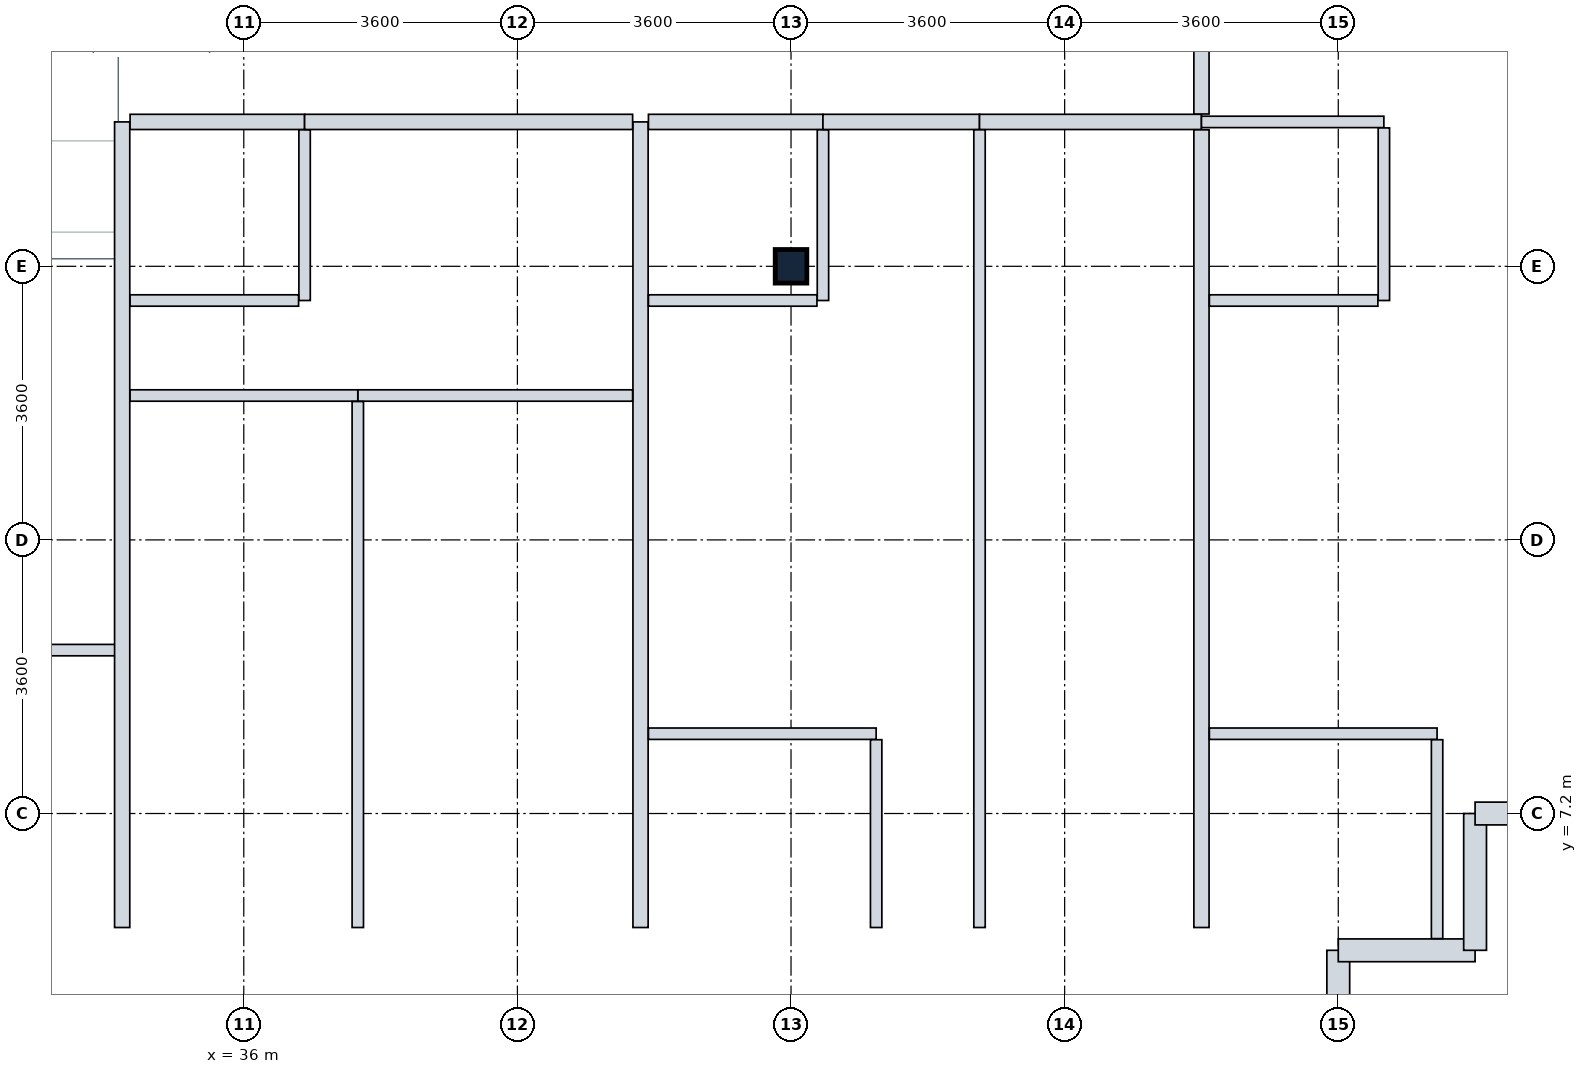
"""IFC4 building model, lengths in metres.
Left out: names, types, materials, properties, quantities, classifications, styles, units other than length and angle.
Written with IfcOpenShell. Run it as: python <this file> out.ifc"""

import sys

from ifc_helpers import new_model, si_unit, direction, frame, frame_2d, origin, origin_2d, place, context, subcontext, project, spatial, rectangle, i_section, extrude, element, fill, save


model = new_model("IFC4")
c1 = context("Model", 3, precision=1e-05, world=origin(), true_north=direction((0.0, 1.0)))
c2 = subcontext(c1, "Body", "Model", "MODEL_VIEW")
j1 = project(units=[si_unit("LENGTHUNIT", "METRE"), si_unit("PLANEANGLEUNIT", "RADIAN")], contexts=[c1])
p1 = place(None, origin())
s1 = spatial("IfcSite", under=j1, at=p1, CompositionType="ELEMENT")
p2 = place(p1, origin())
s2 = spatial("IfcBuilding", under=s1, at=p2, CompositionType="ELEMENT")
p3 = place(p2, frame((0.0, 0.0, 139.0)))
s3 = spatial("IfcBuildingStorey", under=s2, at=p3, CompositionType="ELEMENT", Elevation=139.0)
p4 = place(p3, frame((43.2, 14.4, 0.0), z_axis=(0.0, 0.0, 1.0), x_axis=(1.0, 0.0, 0.0)))
e1 = element("IfcColumn", 1, at=p4, inside=s3, PredefinedType="COLUMN", context=c2, shape_type="SweptSolid", body=[
    extrude(i_section(OverallWidth=0.416, OverallDepth=0.442, WebThickness=0.025, FlangeThickness=0.041, FilletRadius=0.015, at=origin_2d()), origin(), (0.0, 0.0, 1.0), 3.8),
])
p5 = place(p3, frame((50.4, 5.4, 0.0), z_axis=(0.0, 0.0, 1.0), x_axis=(0.0, -1.0, 0.0)))
e2 = element("IfcWall", 2, at=p5, inside=s3, PredefinedType="STANDARD", context=c2, shape_type="SweptSolid", body=[
    extrude(rectangle(XDim=1.8, YDim=0.3, at=frame_2d((0.9, 0.0))), origin(), (0.0, 0.0, 1.0), 2.93),
])
for number, where, z_axis, x_axis in (
    (3, (52.2, 5.4, 0.0), (0.0, 0.0, 1.0), (-1.0, 0.0, 0.0)),
    (4, (52.2, 7.2, 0.0), (0.0, 0.0, 1.0), (0.0, -1.0, 0.0)),
):
    element("IfcWall", number, at=place(p3, frame(where, z_axis=z_axis, x_axis=x_axis)), inside=s3, PredefinedType="STANDARD", context=c2, shape_type="SweptSolid", body=[
        extrude(rectangle(XDim=1.8, YDim=0.3, at=frame_2d((0.9, 0.0))), origin(), (0.0, 0.0, 1.0), 3.535),
    ])
p6 = place(p3, frame((54.0, 7.2, 0.0), z_axis=(0.0, 0.0, 1.0), x_axis=(-1.0, 0.0, 0.0)))
e5 = element("IfcWall", 5, at=p6, inside=s3, PredefinedType="STANDARD", context=c2, shape_type="SweptSolid", body=[
    extrude(rectangle(XDim=1.8, YDim=0.3, at=frame_2d((0.9, 0.0))), origin(), (0.0, 0.0, 1.0), 2.93),
])
p7 = place(p3, frame((28.879, 9.35, 0.0), z_axis=(0.0, 0.0, 1.0), x_axis=(1.0, 0.0, 0.0)))
e6 = element("IfcWall", 6, at=p7, inside=s3, PredefinedType="PARTITIONING", context=c2, shape_type="SweptSolid", body=[
    extrude(rectangle(XDim=5.521, YDim=0.15, at=frame_2d((2.76, 0.0))), origin(), (0.0, 0.0, 1.0), 3.535),
])
p8 = place(p7, frame((0.36, 0.0, 0.0)))
e7 = element("IfcOpeningElement", 7, at=p8, cuts=e6, PredefinedType="OPENING", context=c2, shape_type="SweptSolid", body=[
    extrude(rectangle(XDim=1.0, YDim=2.1, at=frame_2d((0.5, 1.05))), frame((0.0, 0.085, 0.0), z_axis=(0.0, -1.0, 0.0), x_axis=(1.0, 0.0, 0.0)), (0.0, 0.0, 1.0), 0.17),
])
p9 = place(p3, frame((34.4, 5.7, 0.0), z_axis=(0.0, 0.0, 1.0), x_axis=(0.0, 1.0, 0.0)))
e8 = element("IfcWall", 8, at=p9, inside=s3, PredefinedType="PARTITIONING", context=c2, shape_type="SweptSolid", body=[
    extrude(rectangle(XDim=10.6, YDim=0.2, at=frame_2d((5.3, 0.0))), origin(), (0.0, 0.0, 1.0), 3.17),
])
p10 = place(p3, frame((41.22, 5.7, 0.0), z_axis=(0.0, 0.0, 1.0), x_axis=(0.0, 1.0, 0.0)))
e9 = element("IfcWall", 9, at=p10, inside=s3, PredefinedType="PARTITIONING", context=c2, shape_type="SweptSolid", body=[
    extrude(rectangle(XDim=10.6, YDim=0.2, at=frame_2d((5.3, 0.0))), origin(), (0.0, 0.0, 1.0), 3.13),
])
p11 = place(p3, frame((34.504, 16.3, 0.0), z_axis=(0.0, 0.0, 1.0), x_axis=(1.0, 0.0, 0.0)))
e10 = element("IfcWall", 10, at=p11, inside=s3, PredefinedType="PARTITIONING", context=c2, shape_type="SweptSolid", body=[
    extrude(rectangle(XDim=2.296, YDim=0.2, at=frame_2d((1.148, 0.0))), origin(), (0.0, 0.0, 1.0), 3.22),
])
p12 = place(p3, frame((36.8, 13.95, 0.0), z_axis=(0.0, 0.0, 1.0), x_axis=(0.0, 1.0, 0.0)))
e11 = element("IfcWall", 11, at=p12, inside=s3, PredefinedType="PARTITIONING", context=c2, shape_type="SweptSolid", body=[
    extrude(rectangle(XDim=2.246, YDim=0.15, at=frame_2d((1.123, 0.0))), origin(), (0.0, 0.0, 1.0), 3.17),
])
p13 = place(p12, frame((0.72, 0.0, 0.0)))
e12 = element("IfcOpeningElement", 12, at=p13, cuts=e11, PredefinedType="OPENING", context=c2, shape_type="SweptSolid", body=[
    extrude(rectangle(XDim=0.85, YDim=2.1, at=frame_2d((0.425, 1.05))), frame((0.0, 0.085, 0.0), z_axis=(0.0, -1.0, 0.0), x_axis=(1.0, 0.0, 0.0)), (0.0, 0.0, 1.0), 0.17),
])
p14 = place(p3, frame((34.504, 13.95, 0.0), z_axis=(0.0, 0.0, 1.0), x_axis=(1.0, 0.0, 0.0)))
e13 = element("IfcWall", 13, at=p14, inside=s3, PredefinedType="PARTITIONING", context=c2, shape_type="SweptSolid", body=[
    extrude(rectangle(XDim=2.217, YDim=0.15, at=frame_2d((1.108, 0.0))), origin(), (0.0, 0.0, 1.0), 3.22),
])
p15 = place(p3, frame((36.8, 16.3, 0.0), z_axis=(0.0, 0.0, 1.0), x_axis=(1.0, 0.0, 0.0)))
e14 = element("IfcWall", 14, at=p15, inside=s3, PredefinedType="PARTITIONING", context=c2, shape_type="SweptSolid", body=[
    extrude(rectangle(XDim=4.316, YDim=0.2, at=frame_2d((2.158, 0.0))), origin(), (0.0, 0.0, 1.0), 3.17),
])
p16 = place(p15, frame((1.71, 0.0, 0.0)))
e15 = element("IfcOpeningElement", 15, at=p16, cuts=e14, PredefinedType="OPENING", context=c2, shape_type="SweptSolid", body=[
    extrude(rectangle(XDim=1.0, YDim=2.1, at=frame_2d((0.5, 1.05))), frame((0.0, 0.11, 0.0), z_axis=(0.0, -1.0, 0.0), x_axis=(1.0, 0.0, 0.0)), (0.0, 0.0, 1.0), 0.22),
])
p17 = place(p3, frame((37.5, 12.7, 0.0), z_axis=(0.0, 0.0, 1.0), x_axis=(1.0, 0.0, 0.0)))
e16 = element("IfcWall", 16, at=p17, inside=s3, PredefinedType="PARTITIONING", context=c2, shape_type="SweptSolid", body=[
    extrude(rectangle(XDim=3.616, YDim=0.15, at=frame_2d((1.808, 0.0))), origin(), (0.0, 0.0, 1.0), 3.17),
])
p18 = place(p17, frame((1.371, 0.0, 0.0)))
e17 = element("IfcOpeningElement", 17, at=p18, cuts=e16, PredefinedType="OPENING", context=c2, shape_type="SweptSolid", body=[
    extrude(rectangle(XDim=0.9, YDim=2.1, at=frame_2d((0.45, 1.05))), frame((0.0, 0.085, 0.0), z_axis=(0.0, -1.0, 0.0), x_axis=(1.0, 0.0, 0.0)), (0.0, 0.0, 1.0), 0.17),
])
p19 = place(p3, frame((34.504, 12.7, 0.0), z_axis=(0.0, 0.0, 1.0), x_axis=(1.0, 0.0, 0.0)))
e18 = element("IfcWall", 18, at=p19, inside=s3, PredefinedType="PARTITIONING", context=c2, shape_type="SweptSolid", body=[
    extrude(rectangle(XDim=2.996, YDim=0.15, at=frame_2d((1.498, 0.0))), origin(), (0.0, 0.0, 1.0), 3.22),
])
p20 = place(p19, frame((1.021, 0.0, 0.0)))
e19 = element("IfcOpeningElement", 19, at=p20, cuts=e18, PredefinedType="OPENING", context=c2, shape_type="SweptSolid", body=[
    extrude(rectangle(XDim=0.85, YDim=2.1, at=frame_2d((0.425, 1.05))), frame((0.0, 0.085, 0.0), z_axis=(0.0, -1.0, 0.0), x_axis=(1.0, 0.0, 0.0)), (0.0, 0.0, 1.0), 0.17),
])
p21 = place(p3, frame((37.5, 5.7, 0.0), z_axis=(0.0, 0.0, 1.0), x_axis=(0.0, 1.0, 0.0)))
e20 = element("IfcWall", 20, at=p21, inside=s3, PredefinedType="PARTITIONING", context=c2, shape_type="SweptSolid", body=[
    extrude(rectangle(XDim=6.921, YDim=0.15, at=frame_2d((3.46, 0.0))), origin(), (0.0, 0.0, 1.0), 3.08),
])
p22 = place(p3, frame((41.324, 16.3, 0.0), z_axis=(0.0, 0.0, 1.0), x_axis=(1.0, 0.0, 0.0)))
e21 = element("IfcWall", 21, at=p22, inside=s3, PredefinedType="PARTITIONING", context=c2, shape_type="SweptSolid", body=[
    extrude(rectangle(XDim=2.296, YDim=0.2, at=frame_2d((1.148, 0.0))), origin(), (0.0, 0.0, 1.0), 3.18),
])
p23 = place(p3, frame((43.62, 13.95, 0.0), z_axis=(0.0, 0.0, 1.0), x_axis=(0.0, 1.0, 0.0)))
e22 = element("IfcWall", 22, at=p23, inside=s3, PredefinedType="PARTITIONING", context=c2, shape_type="SweptSolid", body=[
    extrude(rectangle(XDim=2.246, YDim=0.15, at=frame_2d((1.123, 0.0))), origin(), (0.0, 0.0, 1.0), 3.17),
])
p24 = place(p23, frame((0.712, 0.0, 0.0)))
e23 = element("IfcOpeningElement", 23, at=p24, cuts=e22, PredefinedType="OPENING", context=c2, shape_type="SweptSolid", body=[
    extrude(rectangle(XDim=0.85, YDim=2.1, at=frame_2d((0.425, 1.05))), frame((0.0, 0.085, 0.0), z_axis=(0.0, -1.0, 0.0), x_axis=(1.0, 0.0, 0.0)), (0.0, 0.0, 1.0), 0.17),
])
p25 = place(p3, frame((41.324, 13.95, 0.0), z_axis=(0.0, 0.0, 1.0), x_axis=(1.0, 0.0, 0.0)))
e24 = element("IfcWall", 24, at=p25, inside=s3, PredefinedType="PARTITIONING", context=c2, shape_type="SweptSolid", body=[
    extrude(rectangle(XDim=2.217, YDim=0.15, at=frame_2d((1.108, 0.0))), origin(), (0.0, 0.0, 1.0), 3.18),
])
p26 = place(p3, frame((43.62, 16.3, 0.0), z_axis=(0.0, 0.0, 1.0), x_axis=(1.0, 0.0, 0.0)))
e25 = element("IfcWall", 25, at=p26, inside=s3, PredefinedType="PARTITIONING", context=c2, shape_type="SweptSolid", body=[
    extrude(rectangle(XDim=2.06, YDim=0.2, at=frame_2d((1.03, 0.0))), origin(), (0.0, 0.0, 1.0), 3.535),
])
p27 = place(p26, frame((0.81, 0.0, 0.0)))
e26 = element("IfcOpeningElement", 26, at=p27, cuts=e25, PredefinedType="OPENING", context=c2, shape_type="SweptSolid", body=[
    extrude(rectangle(XDim=1.0, YDim=2.1, at=frame_2d((0.5, 1.05))), frame((0.0, 0.11, 0.0), z_axis=(0.0, -1.0, 0.0), x_axis=(1.0, 0.0, 0.0)), (0.0, 0.0, 1.0), 0.22),
])
p28 = place(p3, frame((45.68, 16.3, 0.0), z_axis=(0.0, 0.0, 1.0), x_axis=(1.0, 0.0, 0.0)))
e27 = element("IfcWall", 27, at=p28, inside=s3, PredefinedType="PARTITIONING", context=c2, shape_type="SweptSolid", body=[
    extrude(rectangle(XDim=2.92, YDim=0.2, at=frame_2d((1.46, 0.0))), origin(), (0.0, 0.0, 1.0), 3.17),
])
p29 = place(p3, frame((45.68, 5.7, 0.0), z_axis=(0.0, 0.0, 1.0), x_axis=(0.0, 1.0, 0.0)))
e28 = element("IfcWall", 28, at=p29, inside=s3, PredefinedType="PARTITIONING", context=c2, shape_type="SweptSolid", body=[
    extrude(rectangle(XDim=10.496, YDim=0.15, at=frame_2d((5.248, 0.0))), origin(), (0.0, 0.0, 1.0), 3.17),
])
p30 = place(p29, frame((4.81, 0.0, 0.0)))
e29 = element("IfcOpeningElement", 29, at=p30, cuts=e28, PredefinedType="OPENING", context=c2, shape_type="SweptSolid", body=[
    extrude(rectangle(XDim=0.9, YDim=2.1, at=frame_2d((0.45, 1.05))), frame((0.0, 0.085, 0.0), z_axis=(0.0, -1.0, 0.0), x_axis=(1.0, 0.0, 0.0)), (0.0, 0.0, 1.0), 0.17),
])
p31 = place(p3, frame((41.324, 8.25, 0.0), z_axis=(0.0, 0.0, 1.0), x_axis=(1.0, 0.0, 0.0)))
e30 = element("IfcWall", 30, at=p31, inside=s3, PredefinedType="PARTITIONING", context=c2, shape_type="SweptSolid", body=[
    extrude(rectangle(XDim=2.996, YDim=0.15, at=frame_2d((1.498, 0.0))), origin(), (0.0, 0.0, 1.0), 3.18),
])
p32 = place(p31, frame((1.021, 0.0, 0.0)))
e31 = element("IfcOpeningElement", 31, at=p32, cuts=e30, PredefinedType="OPENING", context=c2, shape_type="SweptSolid", body=[
    extrude(rectangle(XDim=0.85, YDim=2.1, at=frame_2d((0.425, 1.05))), frame((0.0, 0.085, 0.0), z_axis=(0.0, -1.0, 0.0), x_axis=(1.0, 0.0, 0.0)), (0.0, 0.0, 1.0), 0.17),
])
p33 = place(p3, frame((44.32, 5.7, 0.0), z_axis=(0.0, 0.0, 1.0), x_axis=(0.0, 1.0, 0.0)))
e32 = element("IfcWall", 32, at=p33, inside=s3, PredefinedType="PARTITIONING", context=c2, shape_type="SweptSolid", body=[
    extrude(rectangle(XDim=2.471, YDim=0.15, at=frame_2d((1.235, 0.0))), origin(), (0.0, 0.0, 1.0), 3.17),
])
p34 = place(p3, frame((48.6, 5.7, 0.0), z_axis=(0.0, 0.0, 1.0), x_axis=(0.0, 1.0, 0.0)))
e33 = element("IfcWall", 33, at=p34, inside=s3, PredefinedType="PARTITIONING", context=c2, shape_type="SweptSolid", body=[
    extrude(rectangle(XDim=10.496, YDim=0.2, at=frame_2d((5.248, 0.0))), origin(), (0.0, 0.0, 1.0), 3.17),
])
p35 = place(p3, frame((48.6, 16.404, 0.0), z_axis=(0.0, 0.0, 1.0), x_axis=(0.0, 1.0, 0.0)))
e34 = element("IfcWall", 34, at=p35, inside=s3, PredefinedType="PARTITIONING", context=c2, shape_type="SweptSolid", body=[
    extrude(rectangle(XDim=1.667, YDim=0.2, at=frame_2d((0.833, 0.0))), origin(), (0.0, 0.0, 1.0), 3.535),
])
p36 = place(p35, frame((0.314, 0.0, 0.0)))
e35 = element("IfcOpeningElement", 35, at=p36, cuts=e34, PredefinedType="OPENING", context=c2, shape_type="SweptSolid", body=[
    extrude(rectangle(XDim=1.0, YDim=2.1, at=frame_2d((0.5, 1.05))), frame((0.0, 0.11, 0.0), z_axis=(0.0, -1.0, 0.0), x_axis=(1.0, 0.0, 0.0)), (0.0, 0.0, 1.0), 0.22),
])
p37 = place(p3, frame((48.6, 16.3, 0.0), z_axis=(0.0, 0.0, 1.0), x_axis=(1.0, 0.0, 0.0)))
e36 = element("IfcWall", 36, at=p37, inside=s3, PredefinedType="PARTITIONING", context=c2, shape_type="SweptSolid", body=[
    extrude(rectangle(XDim=2.4, YDim=0.15, at=frame_2d((1.2, 0.0))), origin(), (0.0, 0.0, 1.0), 3.535),
])
p38 = place(p3, frame((51.0, 13.95, 0.0), z_axis=(0.0, 0.0, 1.0), x_axis=(0.0, 1.0, 0.0)))
e37 = element("IfcWall", 37, at=p38, inside=s3, PredefinedType="PARTITIONING", context=c2, shape_type="SweptSolid", body=[
    extrude(rectangle(XDim=2.271, YDim=0.15, at=frame_2d((1.135, 0.0))), origin(), (0.0, 0.0, 1.0), 3.17),
])
p39 = place(p38, frame((0.78, 0.0, 0.0)))
e38 = element("IfcOpeningElement", 38, at=p39, cuts=e37, PredefinedType="OPENING", context=c2, shape_type="SweptSolid", body=[
    extrude(rectangle(XDim=0.85, YDim=2.1, at=frame_2d((0.425, 1.05))), frame((0.0, 0.085, 0.0), z_axis=(0.0, -1.0, 0.0), x_axis=(1.0, 0.0, 0.0)), (0.0, 0.0, 1.0), 0.17),
])
p40 = place(p3, frame((48.704, 13.95, 0.0), z_axis=(0.0, 0.0, 1.0), x_axis=(1.0, 0.0, 0.0)))
e39 = element("IfcWall", 39, at=p40, inside=s3, PredefinedType="PARTITIONING", context=c2, shape_type="SweptSolid", body=[
    extrude(rectangle(XDim=2.217, YDim=0.15, at=frame_2d((1.108, 0.0))), origin(), (0.0, 0.0, 1.0), 3.535),
])
p41 = place(p3, frame((48.704, 8.25, 0.0), z_axis=(0.0, 0.0, 1.0), x_axis=(1.0, 0.0, 0.0)))
e40 = element("IfcWall", 40, at=p41, inside=s3, PredefinedType="PARTITIONING", context=c2, shape_type="SweptSolid", body=[
    extrude(rectangle(XDim=2.996, YDim=0.15, at=frame_2d((1.498, 0.0))), origin(), (0.0, 0.0, 1.0), 3.535),
])
p42 = place(p41, frame((1.021, 0.0, 0.0)))
e41 = element("IfcOpeningElement", 41, at=p42, cuts=e40, PredefinedType="OPENING", context=c2, shape_type="SweptSolid", body=[
    extrude(rectangle(XDim=0.85, YDim=2.1, at=frame_2d((0.425, 1.05))), frame((0.0, 0.085, 0.0), z_axis=(0.0, -1.0, 0.0), x_axis=(1.0, 0.0, 0.0)), (0.0, 0.0, 1.0), 0.17),
])
p43 = place(p3, frame((51.7, 5.554, 0.0), z_axis=(0.0, 0.0, 1.0), x_axis=(0.0, 1.0, 0.0)))
e42 = element("IfcWall", 42, at=p43, inside=s3, PredefinedType="PARTITIONING", context=c2, shape_type="SweptSolid", body=[
    extrude(rectangle(XDim=2.617, YDim=0.15, at=frame_2d((1.309, 0.0))), origin(), (0.0, 0.0, 1.0), 3.535),
])
p44 = place(p13, origin())
e43 = element("IfcDoor", 43, at=p44, inside=s3, OperationType="SINGLE_SWING_RIGHT", PredefinedType="DOOR", context=c2, shape_type="SweptSolid", body=[
    extrude(rectangle(XDim=0.85, YDim=2.1, at=frame_2d((0.425, 1.05))), frame((0.0, 0.025, 0.0), z_axis=(0.0, -1.0, 0.0), x_axis=(1.0, 0.0, 0.0)), (0.0, 0.0, 1.0), 0.05),
])
fill(e12, e43)
p45 = place(p16, origin())
e44 = element("IfcDoor", 44, at=p45, inside=s3, OperationType="SINGLE_SWING_LEFT", PredefinedType="DOOR", context=c2, shape_type="SweptSolid", body=[
    extrude(rectangle(XDim=1.0, YDim=2.1, at=frame_2d((0.5, 1.05))), frame((0.0, 0.025, 0.0), z_axis=(0.0, -1.0, 0.0), x_axis=(1.0, 0.0, 0.0)), (0.0, 0.0, 1.0), 0.05),
])
fill(e15, e44)
p46 = place(p18, origin())
e45 = element("IfcDoor", 45, at=p46, inside=s3, OperationType="SINGLE_SWING_RIGHT", PredefinedType="DOOR", context=c2, shape_type="SweptSolid", body=[
    extrude(rectangle(XDim=0.9, YDim=2.1, at=frame_2d((0.45, 1.05))), frame((0.0, 0.025, 0.0), z_axis=(0.0, -1.0, 0.0), x_axis=(1.0, 0.0, 0.0)), (0.0, 0.0, 1.0), 0.05),
])
fill(e17, e45)
p47 = place(p20, origin())
e46 = element("IfcDoor", 46, at=p47, inside=s3, OperationType="SINGLE_SWING_LEFT", PredefinedType="DOOR", context=c2, shape_type="SweptSolid", body=[
    extrude(rectangle(XDim=0.85, YDim=2.1, at=frame_2d((0.425, 1.05))), frame((0.0, 0.025, 0.0), z_axis=(0.0, -1.0, 0.0), x_axis=(1.0, 0.0, 0.0)), (0.0, 0.0, 1.0), 0.05),
])
fill(e19, e46)
p48 = place(p24, origin())
e47 = element("IfcDoor", 47, at=p48, inside=s3, OperationType="SINGLE_SWING_RIGHT", PredefinedType="DOOR", context=c2, shape_type="SweptSolid", body=[
    extrude(rectangle(XDim=0.85, YDim=2.1, at=frame_2d((0.425, 1.05))), frame((0.0, 0.025, 0.0), z_axis=(0.0, -1.0, 0.0), x_axis=(1.0, 0.0, 0.0)), (0.0, 0.0, 1.0), 0.05),
])
fill(e23, e47)
p49 = place(p27, origin())
e48 = element("IfcDoor", 48, at=p49, inside=s3, OperationType="SINGLE_SWING_LEFT", PredefinedType="DOOR", context=c2, shape_type="SweptSolid", body=[
    extrude(rectangle(XDim=1.0, YDim=2.1, at=frame_2d((0.5, 1.05))), frame((0.0, 0.025, 0.0), z_axis=(0.0, -1.0, 0.0), x_axis=(1.0, 0.0, 0.0)), (0.0, 0.0, 1.0), 0.05),
])
fill(e26, e48)
p50 = place(p30, origin())
e49 = element("IfcDoor", 49, at=p50, inside=s3, OperationType="SINGLE_SWING_RIGHT", PredefinedType="DOOR", context=c2, shape_type="SweptSolid", body=[
    extrude(rectangle(XDim=0.9, YDim=2.1, at=frame_2d((0.45, 1.05))), frame((0.0, 0.025, 0.0), z_axis=(0.0, -1.0, 0.0), x_axis=(1.0, 0.0, 0.0)), (0.0, 0.0, 1.0), 0.05),
])
fill(e29, e49)
p51 = place(p32, origin())
e50 = element("IfcDoor", 50, at=p51, inside=s3, OperationType="SINGLE_SWING_LEFT", PredefinedType="DOOR", context=c2, shape_type="SweptSolid", body=[
    extrude(rectangle(XDim=0.85, YDim=2.1, at=frame_2d((0.425, 1.05))), frame((0.0, 0.025, 0.0), z_axis=(0.0, -1.0, 0.0), x_axis=(1.0, 0.0, 0.0)), (0.0, 0.0, 1.0), 0.05),
])
fill(e31, e50)
p52 = place(p36, origin())
e51 = element("IfcDoor", 51, at=p52, inside=s3, OperationType="SINGLE_SWING_RIGHT", PredefinedType="DOOR", context=c2, shape_type="SweptSolid", body=[
    extrude(rectangle(XDim=1.0, YDim=2.1, at=frame_2d((0.5, 1.05))), frame((0.0, 0.025, 0.0), z_axis=(0.0, -1.0, 0.0), x_axis=(1.0, 0.0, 0.0)), (0.0, 0.0, 1.0), 0.05),
])
fill(e35, e51)
p53 = place(p39, origin())
e52 = element("IfcDoor", 52, at=p53, inside=s3, OperationType="SINGLE_SWING_RIGHT", PredefinedType="DOOR", context=c2, shape_type="SweptSolid", body=[
    extrude(rectangle(XDim=0.85, YDim=2.1, at=frame_2d((0.425, 1.05))), frame((0.0, 0.025, 0.0), z_axis=(0.0, -1.0, 0.0), x_axis=(1.0, 0.0, 0.0)), (0.0, 0.0, 1.0), 0.05),
])
fill(e38, e52)
p54 = place(p42, origin())
e53 = element("IfcDoor", 53, at=p54, inside=s3, OperationType="SINGLE_SWING_RIGHT", PredefinedType="DOOR", context=c2, shape_type="SweptSolid", body=[
    extrude(rectangle(XDim=0.85, YDim=2.1, at=frame_2d((0.425, 1.05))), frame((0.0, 0.025, 0.0), z_axis=(0.0, -1.0, 0.0), x_axis=(1.0, 0.0, 0.0)), (0.0, 0.0, 1.0), 0.05),
])
fill(e41, e53)
save(model, sys.argv[1])
